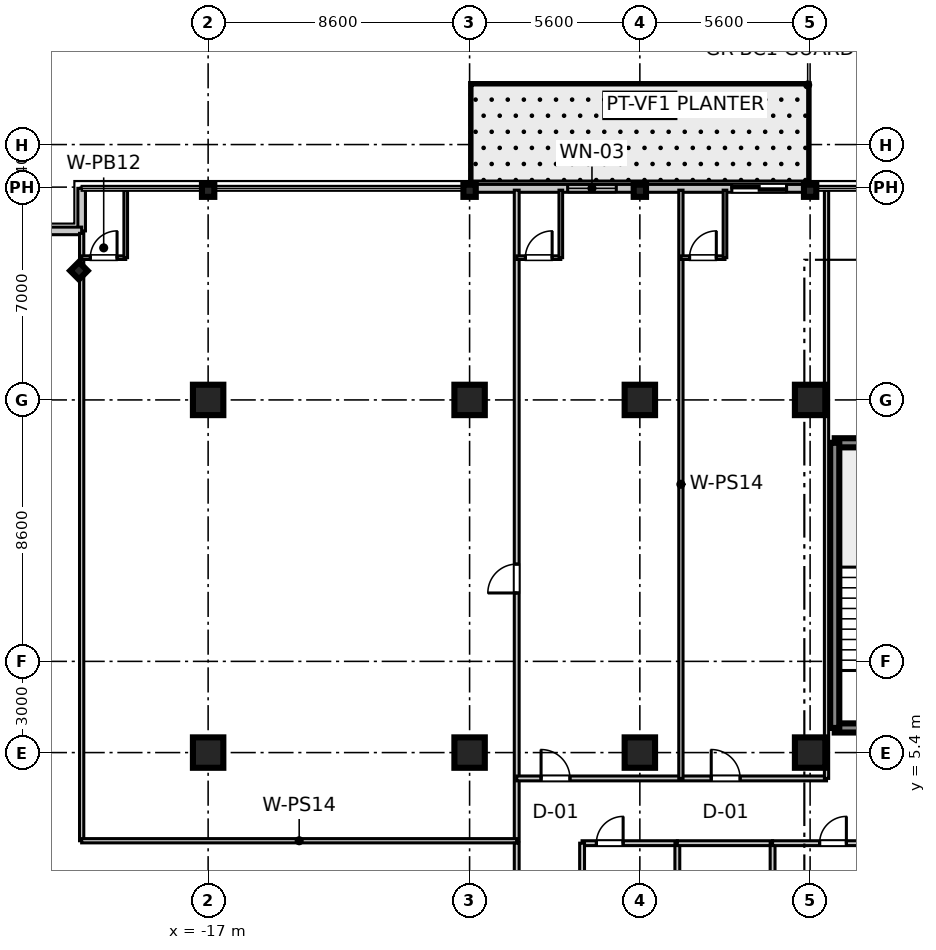
"""IFC4 building model, lengths in metres.
Left out: names, types, materials, properties, quantities, classifications, styles, units other than length and angle.
Written with IfcOpenShell. Run it as: python <this file> out.ifc"""

import sys

from ifc_helpers import new_model, si_unit, direction, frame, frame_2d, origin, origin_2d, place, context, subcontext, project, spatial, rectangle, i_section, extrude, source, transform, mapped, element, fill, save


model = new_model("IFC4")
c1 = context("Model", 3, precision=1e-05, world=origin(), true_north=direction((0.0, 1.0)))
c2 = subcontext(c1, "Body", "Model", "MODEL_VIEW")
j1 = project(units=[si_unit("LENGTHUNIT", "METRE"), si_unit("PLANEANGLEUNIT", "RADIAN")], contexts=[c1])
p1 = place(None, origin())
s1 = spatial("IfcSite", under=j1, at=p1, CompositionType="ELEMENT")
p2 = place(p1, origin())
s2 = spatial("IfcBuilding", under=s1, at=p2, CompositionType="ELEMENT")
p3 = place(p2, frame((0.0, 0.0, 227.1)))
s3 = spatial("IfcBuildingStorey", under=s2, at=p3, CompositionType="ELEMENT", Elevation=227.1)
m1 = source(origin(), c2, "Body", "SweptSolid", [
    extrude(rectangle(XDim=1.0, YDim=1.0, at=origin_2d()), origin(), (0.0, 0.0, 1.0), 3.655),
])
for number, where, z_axis, x_axis in (
    (1, (-17.0, 5.4, 0.0), (0.0, 0.0, 1.0), (1.0, 0.0, 0.0)),
    (2, (-17.0, 17.0, 0.0), (0.0, 0.0, 1.0), (1.0, 0.0, 0.0)),
    (3, (-8.4, 5.4, 0.0), (0.0, 0.0, 1.0), (1.0, 0.0, 0.0)),
    (4, (-8.4, 17.0, 0.0), (0.0, 0.0, 1.0), (1.0, 0.0, 0.0)),
    (5, (-2.8, 5.4, 0.0), (0.0, 0.0, 1.0), (1.0, 0.0, 0.0)),
    (6, (-2.8, 17.0, 0.0), (0.0, 0.0, 1.0), (1.0, 0.0, 0.0)),
    (7, (2.8, 5.4, 0.0), (0.0, 0.0, 1.0), (1.0, 0.0, 0.0)),
    (8, (2.8, 17.0, 0.0), (0.0, 0.0, 1.0), (1.0, 0.0, 0.0)),
):
    element("IfcColumn", number, at=place(p3, frame(where, z_axis=z_axis, x_axis=x_axis)), inside=s3, PredefinedType="COLUMN", context=c2, shape_type="MappedRepresentation", body=[
        mapped(m1, transform((0.0, 0.0, 0.0), scale=1.0)),
    ])
m2 = source(origin(), c2, "Body", "SweptSolid", [
    extrude(i_section(OverallWidth=0.401, OverallDepth=0.406, WebThickness=0.016, FlangeThickness=0.025, at=origin_2d()), origin(), (0.0, 0.0, 1.0), 3.655),
])
for number, where, z_axis, x_axis in (
    (9, (-17.0, 23.88, 0.0), (0.0, 0.0, 1.0), (0.0, 1.0, 0.0)),
    (10, (-8.4, 23.88, 0.0), (0.0, 0.0, 1.0), (0.0, 1.0, 0.0)),
    (11, (-2.8, 23.88, 0.0), (0.0, 0.0, 1.0), (0.0, 1.0, 0.0)),
    (12, (2.8, 23.88, 0.0), (0.0, 0.0, 1.0), (0.0, 1.0, 0.0)),
    (13, (-21.25, 21.25, 0.0), (0.0, 0.0, 1.0), (0.707, 0.707, 0.0)),
):
    element("IfcColumn", number, at=place(p3, frame(where, z_axis=z_axis, x_axis=x_axis)), inside=s3, PredefinedType="COLUMN", context=c2, shape_type="MappedRepresentation", body=[
        mapped(m2, transform((0.0, 0.0, 0.0), scale=1.0)),
    ])
m3 = source(origin(), c2, "Body", "SweptSolid", [
    extrude(rectangle(XDim=3.98, YDim=0.3, at=frame_2d((1.99, 0.0))), origin(), (0.0, 0.0, 1.0), 3.41),
])
for number, where, z_axis, x_axis in (
    (14, (3.61, 6.21, 0.0), (0.0, 0.0, 1.0), (1.0, 0.0, 0.0)),
    (15, (3.61, 15.59, 0.0), (0.0, 0.0, 1.0), (1.0, 0.0, 0.0)),
):
    element("IfcWall", number, at=place(p3, frame(where, z_axis=z_axis, x_axis=x_axis)), inside=s3, PredefinedType="SHEAR", context=c2, shape_type="MappedRepresentation", body=[
        mapped(m3, transform((0.0, 0.0, 0.0), scale=1.0)),
    ])
m4 = source(origin(), c2, "Body", "SweptSolid", [
    extrude(rectangle(XDim=9.38, YDim=0.3, at=frame_2d((4.69, 0.0))), origin(), (0.0, 0.0, 1.0), 3.41),
])
p4 = place(p3, frame((3.61, 6.21, 0.0), z_axis=(0.0, 0.0, 1.0), x_axis=(0.0, 1.0, 0.0)))
e16 = element("IfcWall", 16, at=p4, inside=s3, PredefinedType="SHEAR", context=c2, shape_type="MappedRepresentation", body=[
    mapped(m4, transform((0.0, 0.0, 0.0), scale=1.0)),
])
m5 = source(origin(), c2, "Body", "SweptSolid", [
    extrude(rectangle(XDim=1.4, YDim=0.25, at=frame_2d((0.7, 0.0))), origin(), (0.0, 0.0, 1.0), 3.41),
])
p5 = place(p3, frame((-21.16, 22.56, 0.0), z_axis=(0.0, 0.0, 1.0), x_axis=(0.0, 1.0, 0.0)))
e17 = element("IfcWall", 17, at=p5, inside=s3, PredefinedType="STANDARD", context=c2, shape_type="MappedRepresentation", body=[
    mapped(m5, transform((0.0, 0.0, 0.0), scale=1.0)),
])
m6 = source(origin(), c2, "Body", "SweptSolid", [
    extrude(rectangle(XDim=1.4, YDim=0.25, at=frame_2d((0.7, 0.0))), origin(), (0.0, 0.0, 1.0), 3.41),
])
p6 = place(p3, frame((-22.56, 22.56, 0.0), z_axis=(0.0, 0.0, 1.0), x_axis=(1.0, 0.0, 0.0)))
e18 = element("IfcWall", 18, at=p6, inside=s3, PredefinedType="STANDARD", context=c2, shape_type="MappedRepresentation", body=[
    mapped(m6, transform((0.0, 0.0, 0.0), scale=1.0)),
])
m7 = source(origin(), c2, "Body", "SweptSolid", [
    extrude(rectangle(XDim=11.2, YDim=0.26, at=frame_2d((5.6, 0.0))), origin(), (0.0, 0.0, 1.0), 2.89),
])
p7 = place(p3, frame((-8.4, 23.96, 0.0), z_axis=(0.0, 0.0, 1.0), x_axis=(1.0, 0.0, 0.0)))
e19 = element("IfcWall", 19, at=p7, inside=s3, PredefinedType="STANDARD", context=c2, shape_type="MappedRepresentation", body=[
    mapped(m7, transform((0.0, 0.0, 0.0), scale=1.0)),
])
p8 = place(p7, frame((8.625, 0.0, 0.0)))
e20 = element("IfcOpeningElement", 20, at=p8, cuts=e19, PredefinedType="OPENING", context=c2, shape_type="SweptSolid", body=[
    extrude(rectangle(XDim=1.8, YDim=2.25, at=frame_2d((0.9, 1.125))), frame((0.0, 0.14, 0.0), z_axis=(0.0, -1.0, 0.0), x_axis=(1.0, 0.0, 0.0)), (0.0, 0.0, 1.0), 0.28),
])
p9 = place(p7, frame((3.225, 0.0, 0.85)))
e21 = element("IfcOpeningElement", 21, at=p9, cuts=e19, PredefinedType="OPENING", context=c2, shape_type="SweptSolid", body=[
    extrude(rectangle(XDim=1.6, YDim=1.8, at=frame_2d((0.8, 0.9))), frame((0.0, 0.14, 0.0), z_axis=(0.0, -1.0, 0.0), x_axis=(1.0, 0.0, 0.0)), (0.0, 0.0, 1.0), 0.28),
])
m8 = source(origin(), c2, "Body", "SweptSolid", [
    extrude(rectangle(XDim=21.4, YDim=0.16, at=frame_2d((10.7, 0.0))), origin(), (0.0, 0.0, 1.0), 2.75),
])
p10 = place(p3, frame((-6.85, 2.5, 0.0), z_axis=(0.0, 0.0, 1.0), x_axis=(0.0, 1.0, 0.0)))
e22 = element("IfcWall", 22, at=p10, inside=s3, PredefinedType="PARTITIONING", context=c2, shape_type="MappedRepresentation", body=[
    mapped(m8, transform((0.0, 0.0, 0.0), scale=1.0)),
])
p11 = place(p10, frame((8.15, 0.0, 0.0)))
e23 = element("IfcOpeningElement", 23, at=p11, cuts=e22, PredefinedType="OPENING", context=c2, shape_type="SweptSolid", body=[
    extrude(rectangle(XDim=0.95, YDim=2.1, at=frame_2d((0.475, 1.05))), frame((0.0, 0.09, 0.0), z_axis=(0.0, -1.0, 0.0), x_axis=(1.0, 0.0, 0.0)), (0.0, 0.0, 1.0), 0.18),
])
m9 = source(origin(), c2, "Body", "SweptSolid", [
    extrude(rectangle(XDim=19.98, YDim=0.14, at=frame_2d((9.99, 0.0))), origin(), (0.0, 0.0, 1.0), 2.75),
])
p12 = place(p3, frame((-21.16, 2.5, 0.0), z_axis=(0.0, 0.0, 1.0), x_axis=(0.0, 1.0, 0.0)))
e24 = element("IfcWall", 24, at=p12, inside=s3, PredefinedType="PARTITIONING", context=c2, shape_type="MappedRepresentation", body=[
    mapped(m9, transform((0.0, 0.0, 0.0), scale=1.0)),
])
m10 = source(origin(), c2, "Body", "SweptSolid", [
    extrude(rectangle(XDim=14.31, YDim=0.14, at=frame_2d((7.155, 0.0))), origin(), (0.0, 0.0, 1.0), 2.75),
])
p13 = place(p3, frame((-21.16, 2.5, 0.0), z_axis=(0.0, 0.0, 1.0), x_axis=(1.0, 0.0, 0.0)))
e25 = element("IfcWall", 25, at=p13, inside=s3, PredefinedType="PARTITIONING", context=c2, shape_type="MappedRepresentation", body=[
    mapped(m10, transform((0.0, 0.0, 0.0), scale=1.0)),
])
m11 = source(origin(), c2, "Body", "SweptSolid", [
    extrude(rectangle(XDim=1.45, YDim=0.12, at=frame_2d((0.725, 0.0))), origin(), (0.0, 0.0, 1.0), 2.75),
])
p14 = place(p3, frame((-21.16, 21.68, 0.0), z_axis=(0.0, 0.0, 1.0), x_axis=(1.0, 0.0, 0.0)))
e26 = element("IfcWall", 26, at=p14, inside=s3, PredefinedType="PARTITIONING", context=c2, shape_type="MappedRepresentation", body=[
    mapped(m11, transform((0.0, 0.0, 0.0), scale=1.0)),
])
p15 = place(p14, frame((0.285, 0.0, 0.0)))
e27 = element("IfcOpeningElement", 27, at=p15, cuts=e26, PredefinedType="OPENING", context=c2, shape_type="SweptSolid", body=[
    extrude(rectangle(XDim=0.88, YDim=2.1, at=frame_2d((0.44, 1.05))), frame((0.0, 0.07, 0.0), z_axis=(0.0, -1.0, 0.0), x_axis=(1.0, 0.0, 0.0)), (0.0, 0.0, 1.0), 0.14),
])
m12 = source(origin(), c2, "Body", "SweptSolid", [
    extrude(rectangle(XDim=2.22, YDim=0.12, at=frame_2d((1.11, 0.0))), origin(), (0.0, 0.0, 1.0), 2.75),
])
p16 = place(p3, frame((-19.71, 21.68, 0.0), z_axis=(0.0, 0.0, 1.0), x_axis=(0.0, 1.0, 0.0)))
e28 = element("IfcWall", 28, at=p16, inside=s3, PredefinedType="PARTITIONING", context=c2, shape_type="MappedRepresentation", body=[
    mapped(m12, transform((0.0, 0.0, 0.0), scale=1.0)),
])
m13 = source(origin(), c2, "Body", "SweptSolid", [
    extrude(rectangle(XDim=10.19, YDim=0.16, at=frame_2d((5.095, 0.0))), origin(), (0.0, 0.0, 1.0), 2.75),
])
p17 = place(p3, frame((-6.85, 4.55, 0.0), z_axis=(0.0, 0.0, 1.0), x_axis=(1.0, 0.0, 0.0)))
e29 = element("IfcWall", 29, at=p17, inside=s3, PredefinedType="PARTITIONING", context=c2, shape_type="MappedRepresentation", body=[
    mapped(m13, transform((0.0, 0.0, 0.0), scale=1.0)),
])
p18 = place(p17, frame((0.801, 0.0, 0.0)))
e30 = element("IfcOpeningElement", 30, at=p18, cuts=e29, PredefinedType="OPENING", context=c2, shape_type="SweptSolid", body=[
    extrude(rectangle(XDim=0.95, YDim=2.1, at=frame_2d((0.475, 1.05))), frame((0.0, 0.09, 0.0), z_axis=(0.0, -1.0, 0.0), x_axis=(1.0, 0.0, 0.0)), (0.0, 0.0, 1.0), 0.18),
])
p19 = place(p17, frame((6.398, 0.0, 0.0)))
e31 = element("IfcOpeningElement", 31, at=p19, cuts=e29, PredefinedType="OPENING", context=c2, shape_type="SweptSolid", body=[
    extrude(rectangle(XDim=0.95, YDim=2.1, at=frame_2d((0.475, 1.05))), frame((0.0, 0.09, 0.0), z_axis=(0.0, -1.0, 0.0), x_axis=(1.0, 0.0, 0.0)), (0.0, 0.0, 1.0), 0.18),
])
m14 = source(origin(), c2, "Body", "SweptSolid", [
    extrude(rectangle(XDim=19.35, YDim=0.14, at=frame_2d((9.675, 0.0))), origin(), (0.0, 0.0, 1.0), 2.75),
])
p20 = place(p3, frame((3.34, 4.55, 0.0), z_axis=(0.0, 0.0, 1.0), x_axis=(0.0, 1.0, 0.0)))
e32 = element("IfcWall", 32, at=p20, inside=s3, PredefinedType="PARTITIONING", context=c2, shape_type="MappedRepresentation", body=[
    mapped(m14, transform((0.0, 0.0, 0.0), scale=1.0)),
])
m15 = source(origin(), c2, "Body", "SweptSolid", [
    extrude(rectangle(XDim=1.45, YDim=0.12, at=frame_2d((0.725, 0.0))), origin(), (0.0, 0.0, 1.0), 2.75),
])
p21 = place(p3, frame((-6.85, 21.68, 0.0), z_axis=(0.0, 0.0, 1.0), x_axis=(1.0, 0.0, 0.0)))
e33 = element("IfcWall", 33, at=p21, inside=s3, PredefinedType="PARTITIONING", context=c2, shape_type="MappedRepresentation", body=[
    mapped(m15, transform((0.0, 0.0, 0.0), scale=1.0)),
])
p22 = place(p21, frame((0.285, 0.0, 0.0)))
e34 = element("IfcOpeningElement", 34, at=p22, cuts=e33, PredefinedType="OPENING", context=c2, shape_type="SweptSolid", body=[
    extrude(rectangle(XDim=0.88, YDim=2.1, at=frame_2d((0.44, 1.05))), frame((0.0, 0.07, 0.0), z_axis=(0.0, -1.0, 0.0), x_axis=(1.0, 0.0, 0.0)), (0.0, 0.0, 1.0), 0.14),
])
p23 = place(p3, frame((-5.4, 21.68, 0.0), z_axis=(0.0, 0.0, 1.0), x_axis=(0.0, 1.0, 0.0)))
e35 = element("IfcWall", 35, at=p23, inside=s3, PredefinedType="PARTITIONING", context=c2, shape_type="MappedRepresentation", body=[
    mapped(m12, transform((0.0, 0.0, 0.0), scale=1.0)),
])
p24 = place(p3, frame((-1.45, 4.55, 0.0), z_axis=(0.0, 0.0, 1.0), x_axis=(0.0, 1.0, 0.0)))
e36 = element("IfcWall", 36, at=p24, inside=s3, PredefinedType="PARTITIONING", context=c2, shape_type="MappedRepresentation", body=[
    mapped(m14, transform((0.0, 0.0, 0.0), scale=1.0)),
])
p25 = place(p3, frame((-1.45, 21.68, 0.0), z_axis=(0.0, 0.0, 1.0), x_axis=(1.0, 0.0, 0.0)))
e37 = element("IfcWall", 37, at=p25, inside=s3, PredefinedType="PARTITIONING", context=c2, shape_type="MappedRepresentation", body=[
    mapped(m11, transform((0.0, 0.0, 0.0), scale=1.0)),
])
p26 = place(p25, frame((0.285, 0.0, 0.0)))
e38 = element("IfcOpeningElement", 38, at=p26, cuts=e37, PredefinedType="OPENING", context=c2, shape_type="SweptSolid", body=[
    extrude(rectangle(XDim=0.88, YDim=2.1, at=frame_2d((0.44, 1.05))), frame((0.0, 0.07, 0.0), z_axis=(0.0, -1.0, 0.0), x_axis=(1.0, 0.0, 0.0)), (0.0, 0.0, 1.0), 0.14),
])
p27 = place(p3, frame((0.0, 21.68, 0.0), z_axis=(0.0, 0.0, 1.0), x_axis=(0.0, 1.0, 0.0)))
e39 = element("IfcWall", 39, at=p27, inside=s3, PredefinedType="PARTITIONING", context=c2, shape_type="MappedRepresentation", body=[
    mapped(m12, transform((0.0, 0.0, 0.0), scale=1.0)),
])
m16 = source(origin(), c2, "Body", "SweptSolid", [
    extrude(rectangle(XDim=4.84, YDim=0.16, at=frame_2d((2.42, 0.0))), origin(), (0.0, 0.0, 1.0), 2.75),
])
p28 = place(p3, frame((-6.85, -2.42, 0.0), z_axis=(0.0, 0.0, 1.0), x_axis=(0.0, 1.0, 0.0)))
e40 = element("IfcWall", 40, at=p28, inside=s3, PredefinedType="PARTITIONING", context=c2, shape_type="MappedRepresentation", body=[
    mapped(m16, transform((0.0, 0.0, 0.0), scale=1.0)),
])
p29 = place(p28, frame((1.945, 0.0, 0.0)))
e41 = element("IfcOpeningElement", 41, at=p29, cuts=e40, PredefinedType="OPENING", context=c2, shape_type="SweptSolid", body=[
    extrude(rectangle(XDim=0.95, YDim=2.1, at=frame_2d((0.475, 1.05))), frame((0.0, 0.09, 0.0), z_axis=(0.0, -1.0, 0.0), x_axis=(1.0, 0.0, 0.0)), (0.0, 0.0, 1.0), 0.18),
])
m17 = source(origin(), c2, "Body", "SweptSolid", [
    extrude(rectangle(XDim=3.133, YDim=0.16, at=frame_2d((1.566, 0.0))), origin(), (0.0, 0.0, 1.0), 2.75),
])
p30 = place(p3, frame((-4.7, 2.42, 0.0), z_axis=(0.0, 0.0, 1.0), x_axis=(1.0, 0.0, 0.0)))
e42 = element("IfcWall", 42, at=p30, inside=s3, PredefinedType="PARTITIONING", context=c2, shape_type="MappedRepresentation", body=[
    mapped(m17, transform((0.0, 0.0, 0.0), scale=1.0)),
])
p31 = place(p30, frame((0.47, 0.0, 0.0)))
e43 = element("IfcOpeningElement", 43, at=p31, cuts=e42, PredefinedType="OPENING", context=c2, shape_type="SweptSolid", body=[
    extrude(rectangle(XDim=0.88, YDim=2.1, at=frame_2d((0.44, 1.05))), frame((0.0, 0.09, 0.0), z_axis=(0.0, -1.0, 0.0), x_axis=(1.0, 0.0, 0.0)), (0.0, 0.0, 1.0), 0.18),
])
for number, where, z_axis, x_axis in (
    (44, (-4.7, -2.42, 0.0), (0.0, 0.0, 1.0), (0.0, 1.0, 0.0)),
    (45, (-1.567, -2.42, 0.0), (0.0, 0.0, 1.0), (0.0, 1.0, 0.0)),
):
    element("IfcWall", number, at=place(p3, frame(where, z_axis=z_axis, x_axis=x_axis)), inside=s3, PredefinedType="PARTITIONING", context=c2, shape_type="MappedRepresentation", body=[
        mapped(m16, transform((0.0, 0.0, 0.0), scale=1.0)),
    ])
m18 = source(origin(), c2, "Body", "SweptSolid", [
    extrude(rectangle(XDim=3.133, YDim=0.16, at=frame_2d((1.566, 0.0))), origin(), (0.0, 0.0, 1.0), 2.75),
])
p32 = place(p3, frame((-1.567, 2.42, 0.0), z_axis=(0.0, 0.0, 1.0), x_axis=(1.0, 0.0, 0.0)))
e46 = element("IfcWall", 46, at=p32, inside=s3, PredefinedType="PARTITIONING", context=c2, shape_type="MappedRepresentation", body=[
    mapped(m18, transform((0.0, 0.0, 0.0), scale=1.0)),
])
p33 = place(p3, frame((1.566, -2.42, 0.0), z_axis=(0.0, 0.0, 1.0), x_axis=(0.0, 1.0, 0.0)))
e47 = element("IfcWall", 47, at=p33, inside=s3, PredefinedType="PARTITIONING", context=c2, shape_type="MappedRepresentation", body=[
    mapped(m16, transform((0.0, 0.0, 0.0), scale=1.0)),
])
m19 = source(origin(), c2, "Body", "SweptSolid", [
    extrude(rectangle(XDim=2.892, YDim=0.16, at=frame_2d((1.446, 0.0))), origin(), (0.0, 0.0, 1.0), 2.75),
])
p34 = place(p3, frame((1.566, 2.42, 0.0), z_axis=(0.0, 0.0, 1.0), x_axis=(1.0, 0.0, 0.0)))
e48 = element("IfcWall", 48, at=p34, inside=s3, PredefinedType="PARTITIONING", context=c2, shape_type="MappedRepresentation", body=[
    mapped(m19, transform((0.0, 0.0, 0.0), scale=1.0)),
])
p35 = place(p34, frame((1.547, 0.0, 0.0)))
e49 = element("IfcOpeningElement", 49, at=p35, cuts=e48, PredefinedType="OPENING", context=c2, shape_type="SweptSolid", body=[
    extrude(rectangle(XDim=0.88, YDim=2.1, at=frame_2d((0.44, 1.05))), frame((0.0, 0.09, 0.0), z_axis=(0.0, -1.0, 0.0), x_axis=(1.0, 0.0, 0.0)), (0.0, 0.0, 1.0), 0.18),
])
m20 = source(origin(), c2, "Body", "SweptSolid", [
    extrude(rectangle(XDim=0.88, YDim=2.1, at=frame_2d((0.44, 1.05))), frame((0.0, 0.025, 0.0), z_axis=(0.0, -1.0, 0.0), x_axis=(1.0, 0.0, 0.0)), (0.0, 0.0, 1.0), 0.05),
])
p36 = place(p15, origin())
e50 = element("IfcDoor", 50, at=p36, inside=s3, OperationType="SINGLE_SWING_RIGHT", PredefinedType="DOOR", context=c2, shape_type="MappedRepresentation", body=[
    mapped(m20, transform((0.0, 0.0, 0.0), scale=1.0)),
])
fill(e27, e50)
m21 = source(origin(), c2, "Body", "SweptSolid", [
    extrude(rectangle(XDim=0.95, YDim=2.1, at=frame_2d((0.475, 1.05))), frame((0.0, 0.025, 0.0), z_axis=(0.0, -1.0, 0.0), x_axis=(1.0, 0.0, 0.0)), (0.0, 0.0, 1.0), 0.05),
])
p37 = place(p11, origin())
e51 = element("IfcDoor", 51, at=p37, inside=s3, OperationType="SINGLE_SWING_LEFT", PredefinedType="DOOR", context=c2, shape_type="MappedRepresentation", body=[
    mapped(m21, transform((0.0, 0.0, 0.0), scale=1.0)),
])
fill(e23, e51)
p38 = place(p22, origin())
e52 = element("IfcDoor", 52, at=p38, inside=s3, OperationType="SINGLE_SWING_RIGHT", PredefinedType="DOOR", context=c2, shape_type="MappedRepresentation", body=[
    mapped(m20, transform((0.0, 0.0, 0.0), scale=1.0)),
])
fill(e34, e52)
p39 = place(p18, origin())
e53 = element("IfcDoor", 53, at=p39, inside=s3, OperationType="SINGLE_SWING_LEFT", PredefinedType="DOOR", context=c2, shape_type="MappedRepresentation", body=[
    mapped(m21, transform((0.0, 0.0, 0.0), scale=1.0)),
])
fill(e30, e53)
p40 = place(p26, origin())
e54 = element("IfcDoor", 54, at=p40, inside=s3, OperationType="SINGLE_SWING_RIGHT", PredefinedType="DOOR", context=c2, shape_type="MappedRepresentation", body=[
    mapped(m20, transform((0.0, 0.0, 0.0), scale=1.0)),
])
fill(e38, e54)
p41 = place(p19, origin())
e55 = element("IfcDoor", 55, at=p41, inside=s3, OperationType="SINGLE_SWING_LEFT", PredefinedType="DOOR", context=c2, shape_type="MappedRepresentation", body=[
    mapped(m21, transform((0.0, 0.0, 0.0), scale=1.0)),
])
fill(e31, e55)
p42 = place(p31, frame((0.88, 0.0, 0.0), z_axis=(0.0, 0.0, 1.0), x_axis=(-1.0, 0.0, 0.0)))
e56 = element("IfcDoor", 56, at=p42, inside=s3, OperationType="SINGLE_SWING_RIGHT", PredefinedType="DOOR", context=c2, shape_type="MappedRepresentation", body=[
    mapped(m20, transform((0.0, 0.0, 0.0), scale=1.0)),
])
fill(e43, e56)
p43 = place(p35, frame((0.88, 0.0, 0.0), z_axis=(0.0, 0.0, 1.0), x_axis=(-1.0, 0.0, 0.0)))
e57 = element("IfcDoor", 57, at=p43, inside=s3, OperationType="SINGLE_SWING_RIGHT", PredefinedType="DOOR", context=c2, shape_type="MappedRepresentation", body=[
    mapped(m20, transform((0.0, 0.0, 0.0), scale=1.0)),
])
fill(e49, e57)
m22 = source(origin(), c2, "Body", "SweptSolid", [
    extrude(rectangle(XDim=1.8, YDim=2.25, at=frame_2d((0.9, 1.125))), frame((0.0, 0.025, 0.0), z_axis=(0.0, -1.0, 0.0), x_axis=(1.0, 0.0, 0.0)), (0.0, 0.0, 1.0), 0.05),
])
p44 = place(p8, origin())
e58 = element("IfcDoor", 58, at=p44, inside=s3, OperationType="DOUBLE_DOOR_SLIDING", PredefinedType="DOOR", context=c2, shape_type="MappedRepresentation", body=[
    mapped(m22, transform((0.0, 0.0, 0.0), scale=1.0)),
])
fill(e20, e58)
m23 = source(origin(), c2, "Body", "SweptSolid", [
    extrude(rectangle(XDim=1.6, YDim=1.8, at=frame_2d((0.8, 0.9))), frame((0.0, 0.03, 0.0), z_axis=(0.0, -1.0, 0.0), x_axis=(1.0, 0.0, 0.0)), (0.0, 0.0, 1.0), 0.06),
])
p45 = place(p9, origin())
e59 = element("IfcWindow", 59, at=p45, inside=s3, PartitioningType="SINGLE_PANEL", PredefinedType="WINDOW", context=c2, shape_type="MappedRepresentation", body=[
    mapped(m23, transform((0.0, 0.0, 0.0), scale=1.0)),
])
fill(e21, e59)
save(model, sys.argv[1])
